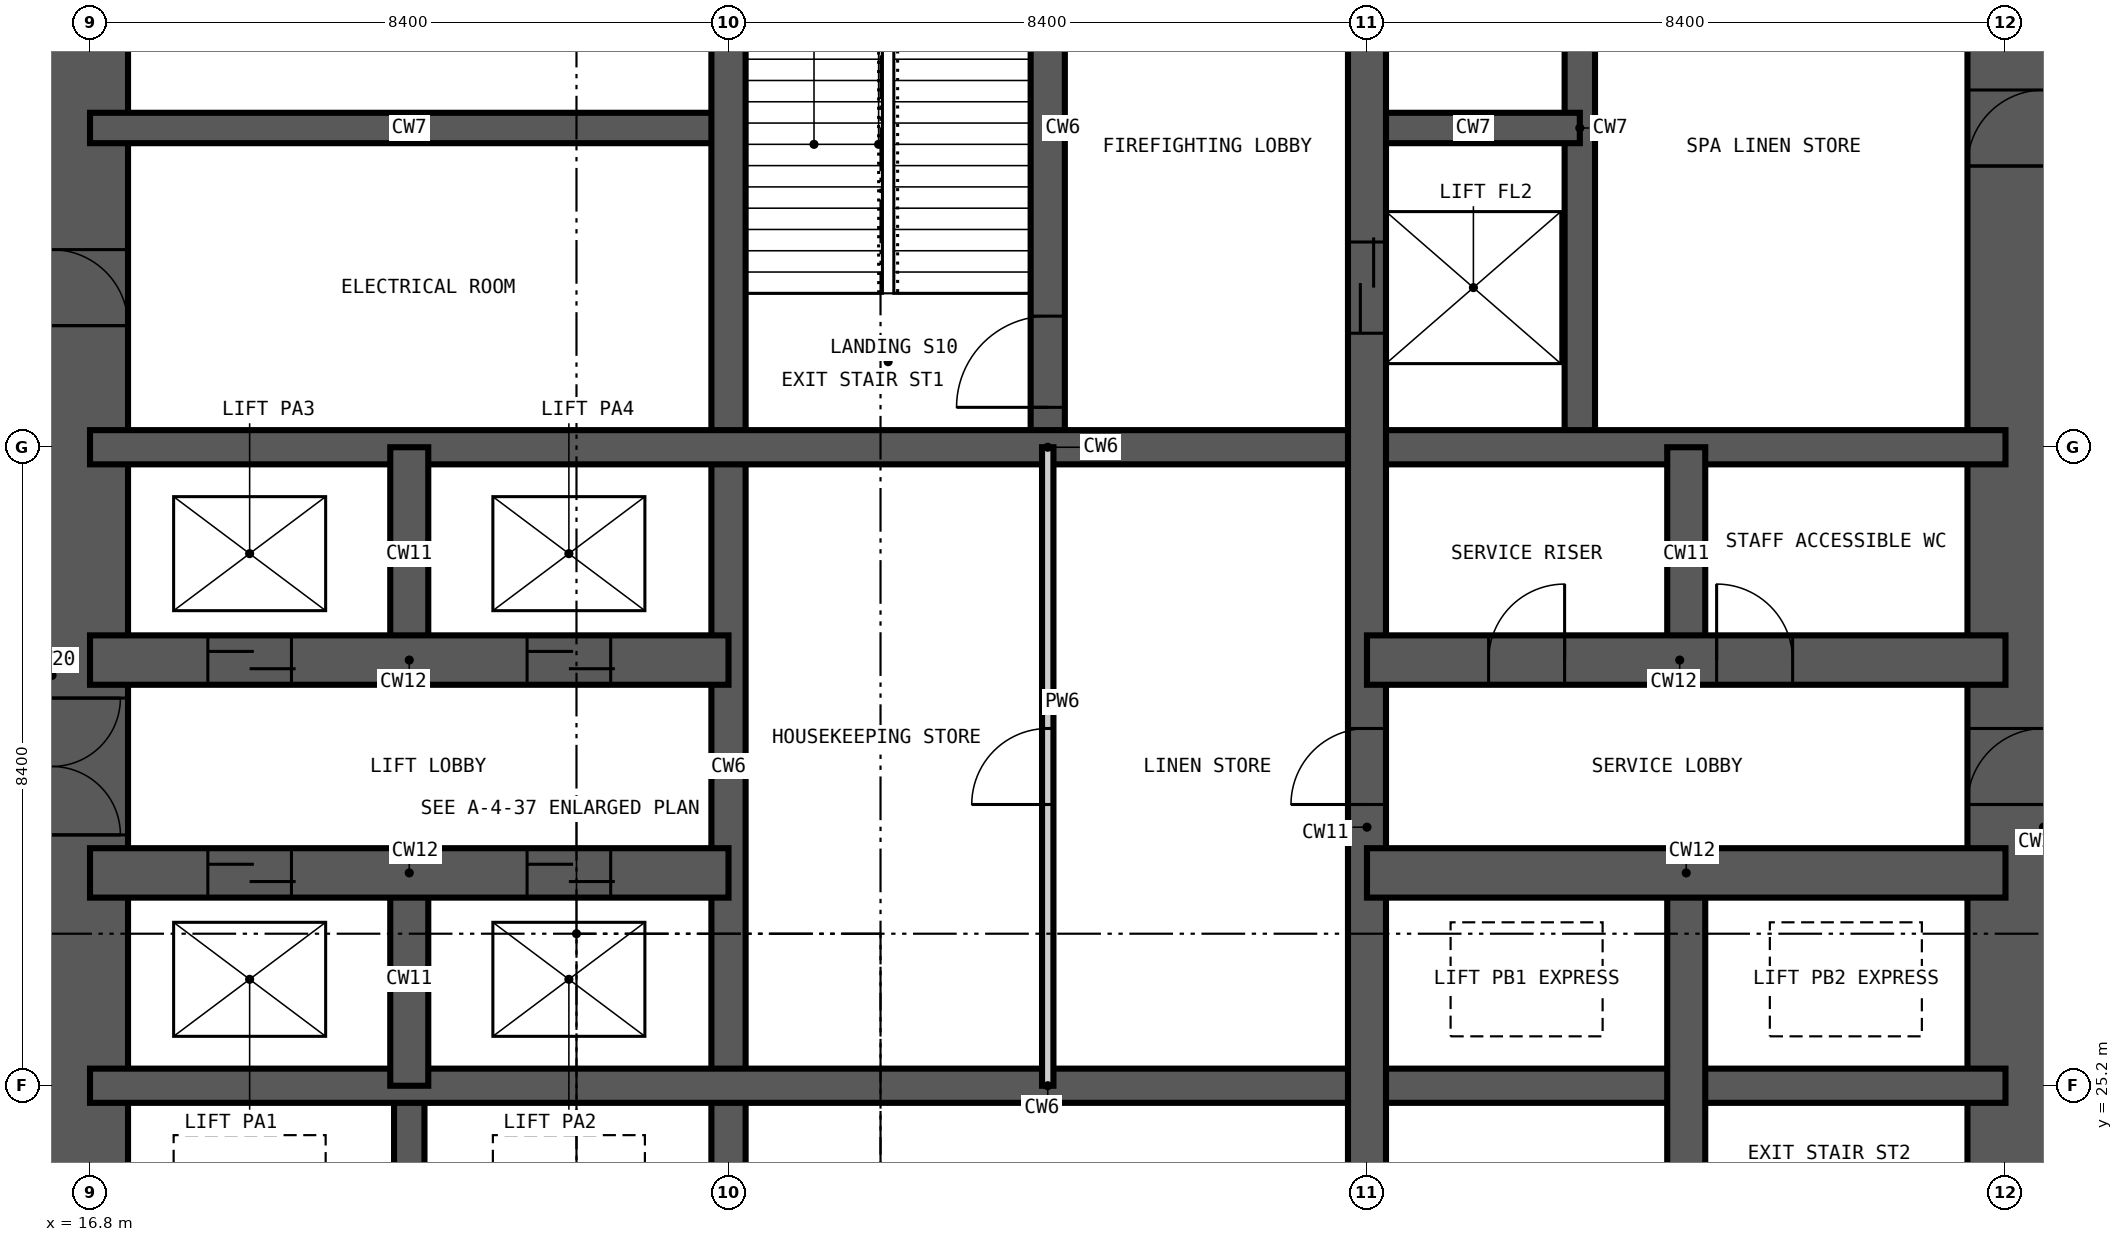
"""IFC4 building model, lengths in metres.
Left out: names, types, materials, properties, quantities, classifications, styles, units other than length and angle.
Written with IfcOpenShell. Run it as: python <this file> out.ifc"""

import sys

from ifc_helpers import new_model, si_unit, direction, frame, frame_2d, origin, place, context, subcontext, project, spatial, rectangle, extrude, element, fill, save


model = new_model("IFC4")
c1 = context("Model", 3, precision=1e-05, world=origin(), true_north=direction((0.0, 1.0)))
c2 = subcontext(c1, "Body", "Model", "MODEL_VIEW")
j1 = project(units=[si_unit("LENGTHUNIT", "METRE"), si_unit("PLANEANGLEUNIT", "RADIAN")], contexts=[c1])
p1 = place(None, origin())
s1 = spatial("IfcSite", under=j1, at=p1, CompositionType="ELEMENT")
p2 = place(p1, origin())
s2 = spatial("IfcBuilding", under=s1, at=p2, CompositionType="ELEMENT")
p3 = place(p2, frame((0.0, 0.0, 22.0)))
s3 = spatial("IfcBuildingStorey", under=s2, at=p3, CompositionType="ELEMENT", Elevation=22.0)
p4 = place(p3, frame((42.5, 17.3, -0.35), z_axis=(0.0, 0.0, 1.0), x_axis=(0.0, 1.0, 0.0)))
e1 = element("IfcWall", 1, at=p4, inside=s3, PredefinedType="SHEAR", context=c2, shape_type="SweptSolid", body=[
    extrude(rectangle(XDim=24.2, YDim=2.0, at=frame_2d((12.1, 0.0))), origin(), (0.0, 0.0, 1.0), 5.0),
])
p5 = place(p4, frame((0.3, 0.0, 0.35)))
e2 = element("IfcOpeningElement", 2, at=p5, cuts=e1, PredefinedType="OPENING", context=c2, shape_type="SweptSolid", body=[
    extrude(rectangle(XDim=1.2, YDim=2.2, at=frame_2d((0.6, 1.1))), frame((0.0, 1.01, 0.0), z_axis=(0.0, -1.0, 0.0), x_axis=(1.0, 0.0, 0.0)), (0.0, 0.0, 1.0), 2.02),
])
p6 = place(p4, frame((11.6, 0.0, 0.35)))
e3 = element("IfcOpeningElement", 3, at=p6, cuts=e1, PredefinedType="OPENING", context=c2, shape_type="SweptSolid", body=[
    extrude(rectangle(XDim=1.0, YDim=2.1, at=frame_2d((0.5, 1.05))), frame((0.0, 1.01, 0.0), z_axis=(0.0, -1.0, 0.0), x_axis=(1.0, 0.0, 0.0)), (0.0, 0.0, 1.0), 2.02),
])
p7 = place(p4, frame((20.0, 0.0, 0.35)))
e4 = element("IfcOpeningElement", 4, at=p7, cuts=e1, PredefinedType="OPENING", context=c2, shape_type="SweptSolid", body=[
    extrude(rectangle(XDim=1.0, YDim=2.1, at=frame_2d((0.5, 1.05))), frame((0.0, 1.01, 0.0), z_axis=(0.0, -1.0, 0.0), x_axis=(1.0, 0.0, 0.0)), (0.0, 0.0, 1.0), 2.02),
])
p8 = place(p3, frame((16.3, 41.5, -0.35), z_axis=(0.0, 0.0, 1.0), x_axis=(0.0, -1.0, 0.0)))
e5 = element("IfcWall", 5, at=p8, inside=s3, PredefinedType="SHEAR", context=c2, shape_type="SweptSolid", body=[
    extrude(rectangle(XDim=24.2, YDim=2.0, at=frame_2d((12.1, 0.0))), origin(), (0.0, 0.0, 1.0), 5.0),
])
p9 = place(p8, frame((11.2, 0.0, 0.35)))
e6 = element("IfcOpeningElement", 6, at=p9, cuts=e5, PredefinedType="OPENING", context=c2, shape_type="SweptSolid", body=[
    extrude(rectangle(XDim=1.8, YDim=2.2, at=frame_2d((0.9, 1.1))), frame((0.0, 1.01, 0.0), z_axis=(0.0, -1.0, 0.0), x_axis=(1.0, 0.0, 0.0)), (0.0, 0.0, 1.0), 2.02),
])
p10 = place(p8, frame((20.0, 0.0, 0.35)))
e7 = element("IfcOpeningElement", 7, at=p10, cuts=e5, PredefinedType="OPENING", context=c2, shape_type="SweptSolid", body=[
    extrude(rectangle(XDim=1.0, YDim=2.1, at=frame_2d((0.5, 1.05))), frame((0.0, 1.01, 0.0), z_axis=(0.0, -1.0, 0.0), x_axis=(1.0, 0.0, 0.0)), (0.0, 0.0, 1.0), 2.02),
])
p11 = place(p8, frame((5.3, 0.0, 0.35)))
e8 = element("IfcOpeningElement", 8, at=p11, cuts=e5, PredefinedType="OPENING", context=c2, shape_type="SweptSolid", body=[
    extrude(rectangle(XDim=1.0, YDim=2.1, at=frame_2d((0.5, 1.05))), frame((0.0, 1.01, 0.0), z_axis=(0.0, -1.0, 0.0), x_axis=(1.0, 0.0, 0.0)), (0.0, 0.0, 1.0), 2.02),
])
p12 = place(p3, frame((21.0, 22.4, -0.35), z_axis=(0.0, 0.0, 1.0), x_axis=(0.0, 1.0, 0.0)))
e9 = element("IfcWall", 9, at=p12, inside=s3, PredefinedType="SHEAR", context=c2, shape_type="SweptSolid", body=[
    extrude(rectangle(XDim=2.8, YDim=0.4, at=frame_2d((1.4, 0.0))), origin(), (0.0, 0.0, 1.0), 5.0),
])
for number, where, z_axis, x_axis in (
    (10, (36.4, 33.6, -0.35), (0.0, 0.0, 1.0), (0.0, 1.0, 0.0)),
    (11, (16.8, 37.8, -0.35), (0.0, 0.0, 1.0), (1.0, 0.0, 0.0)),
):
    element("IfcWall", number, at=place(p3, frame(where, z_axis=z_axis, x_axis=x_axis)), inside=s3, PredefinedType="SHEAR", context=c2, shape_type="SweptSolid", body=[
        extrude(rectangle(XDim=8.4, YDim=0.4, at=frame_2d((4.2, 0.0))), origin(), (0.0, 0.0, 1.0), 5.0),
    ])
p13 = place(p3, frame((33.6, 37.8, -0.35), z_axis=(0.0, 0.0, 1.0), x_axis=(1.0, 0.0, 0.0)))
e12 = element("IfcWall", 12, at=p13, inside=s3, PredefinedType="SHEAR", context=c2, shape_type="SweptSolid", body=[
    extrude(rectangle(XDim=2.8, YDim=0.4, at=frame_2d((1.4, 0.0))), origin(), (0.0, 0.0, 1.0), 5.0),
])
p14 = place(p3, frame((25.2, 16.8, -0.35), z_axis=(0.0, 0.0, 1.0), x_axis=(0.0, 1.0, 0.0)))
e13 = element("IfcWall", 13, at=p14, inside=s3, PredefinedType="SHEAR", context=c2, shape_type="SweptSolid", body=[
    extrude(rectangle(XDim=25.2, YDim=0.45, at=frame_2d((12.6, 0.0))), origin(), (0.0, 0.0, 1.0), 5.0),
])
p15 = place(p3, frame((29.4, 33.6, -0.35), z_axis=(0.0, 0.0, 1.0), x_axis=(0.0, 1.0, 0.0)))
e14 = element("IfcWall", 14, at=p15, inside=s3, PredefinedType="SHEAR", context=c2, shape_type="SweptSolid", body=[
    extrude(rectangle(XDim=8.4, YDim=0.45, at=frame_2d((4.2, 0.0))), origin(), (0.0, 0.0, 1.0), 5.0),
])
p16 = place(p15, frame((0.525, 0.0, 0.35)))
e15 = element("IfcOpeningElement", 15, at=p16, cuts=e14, PredefinedType="OPENING", context=c2, shape_type="SweptSolid", body=[
    extrude(rectangle(XDim=1.2, YDim=2.2, at=frame_2d((0.6, 1.1))), frame((0.0, 0.235, 0.0), z_axis=(0.0, -1.0, 0.0), x_axis=(1.0, 0.0, 0.0)), (0.0, 0.0, 1.0), 0.47),
])
for number, where, z_axis, x_axis in (
    (16, (16.8, 25.2, -0.35), (0.0, 0.0, 1.0), (1.0, 0.0, 0.0)),
    (17, (16.8, 33.6, -0.35), (0.0, 0.0, 1.0), (1.0, 0.0, 0.0)),
):
    element("IfcWall", number, at=place(p3, frame(where, z_axis=z_axis, x_axis=x_axis)), inside=s3, PredefinedType="SHEAR", context=c2, shape_type="SweptSolid", body=[
        extrude(rectangle(XDim=25.2, YDim=0.45, at=frame_2d((12.6, 0.0))), origin(), (0.0, 0.0, 1.0), 5.0),
    ])
for number, where, z_axis, x_axis in (
    (18, (21.0, 25.2, -0.35), (0.0, 0.0, 1.0), (0.0, 1.0, 0.0)),
    (19, (21.0, 30.8, -0.35), (0.0, 0.0, 1.0), (0.0, 1.0, 0.0)),
):
    element("IfcWall", number, at=place(p3, frame(where, z_axis=z_axis, x_axis=x_axis)), inside=s3, PredefinedType="SHEAR", context=c2, shape_type="SweptSolid", body=[
        extrude(rectangle(XDim=2.8, YDim=0.5, at=frame_2d((1.4, 0.0))), origin(), (0.0, 0.0, 1.0), 5.0),
    ])
p17 = place(p3, frame((33.6, 16.8, -0.35), z_axis=(0.0, 0.0, 1.0), x_axis=(0.0, 1.0, 0.0)))
e20 = element("IfcWall", 20, at=p17, inside=s3, PredefinedType="SHEAR", context=c2, shape_type="SweptSolid", body=[
    extrude(rectangle(XDim=25.2, YDim=0.5, at=frame_2d((12.6, 0.0))), origin(), (0.0, 0.0, 1.0), 5.0),
])
p18 = place(p17, frame((22.5, 0.0, 0.35)))
e21 = element("IfcOpeningElement", 21, at=p18, cuts=e20, PredefinedType="OPENING", context=c2, shape_type="SweptSolid", body=[
    extrude(rectangle(XDim=1.2, YDim=2.2, at=frame_2d((0.6, 1.1))), frame((0.0, 0.26, 0.0), z_axis=(0.0, -1.0, 0.0), x_axis=(1.0, 0.0, 0.0)), (0.0, 0.0, 1.0), 0.52),
])
p19 = place(p17, frame((18.3, 0.0, 0.35)))
e22 = element("IfcOpeningElement", 22, at=p19, cuts=e20, PredefinedType="OPENING", context=c2, shape_type="SweptSolid", body=[
    extrude(rectangle(XDim=1.2, YDim=2.2, at=frame_2d((0.6, 1.1))), frame((0.0, 0.26, 0.0), z_axis=(0.0, -1.0, 0.0), x_axis=(1.0, 0.0, 0.0)), (0.0, 0.0, 1.0), 0.52),
])
p20 = place(p17, frame((12.1, 0.0, 0.35)))
e23 = element("IfcOpeningElement", 23, at=p20, cuts=e20, PredefinedType="OPENING", context=c2, shape_type="SweptSolid", body=[
    extrude(rectangle(XDim=1.0, YDim=2.1, at=frame_2d((0.5, 1.05))), frame((0.0, 0.26, 0.0), z_axis=(0.0, -1.0, 0.0), x_axis=(1.0, 0.0, 0.0)), (0.0, 0.0, 1.0), 0.52),
])
p21 = place(p3, frame((37.8, 16.8, -0.35), z_axis=(0.0, 0.0, 1.0), x_axis=(0.0, 1.0, 0.0)))
e24 = element("IfcWall", 24, at=p21, inside=s3, PredefinedType="SHEAR", context=c2, shape_type="SweptSolid", body=[
    extrude(rectangle(XDim=11.2, YDim=0.5, at=frame_2d((5.6, 0.0))), origin(), (0.0, 0.0, 1.0), 5.0),
])
p22 = place(p3, frame((37.8, 30.8, -0.35), z_axis=(0.0, 0.0, 1.0), x_axis=(0.0, 1.0, 0.0)))
e25 = element("IfcWall", 25, at=p22, inside=s3, PredefinedType="SHEAR", context=c2, shape_type="SweptSolid", body=[
    extrude(rectangle(XDim=2.8, YDim=0.5, at=frame_2d((1.4, 0.0))), origin(), (0.0, 0.0, 1.0), 5.0),
])
p23 = place(p3, frame((16.8, 28.0, -0.35), z_axis=(0.0, 0.0, 1.0), x_axis=(1.0, 0.0, 0.0)))
e26 = element("IfcWall", 26, at=p23, inside=s3, PredefinedType="SHEAR", context=c2, shape_type="SweptSolid", body=[
    extrude(rectangle(XDim=8.4, YDim=0.65, at=frame_2d((4.2, 0.0))), origin(), (0.0, 0.0, 1.0), 5.0),
])
p24 = place(p23, frame((1.55, 0.0, 0.35)))
e27 = element("IfcOpeningElement", 27, at=p24, cuts=e26, PredefinedType="OPENING", context=c2, shape_type="SweptSolid", body=[
    extrude(rectangle(XDim=1.1, YDim=2.2, at=frame_2d((0.55, 1.1))), frame((0.0, 0.335, 0.0), z_axis=(0.0, -1.0, 0.0), x_axis=(1.0, 0.0, 0.0)), (0.0, 0.0, 1.0), 0.67),
])
p25 = place(p23, frame((5.75, 0.0, 0.35)))
e28 = element("IfcOpeningElement", 28, at=p25, cuts=e26, PredefinedType="OPENING", context=c2, shape_type="SweptSolid", body=[
    extrude(rectangle(XDim=1.1, YDim=2.2, at=frame_2d((0.55, 1.1))), frame((0.0, 0.335, 0.0), z_axis=(0.0, -1.0, 0.0), x_axis=(1.0, 0.0, 0.0)), (0.0, 0.0, 1.0), 0.67),
])
p26 = place(p3, frame((33.6, 28.0, -0.35), z_axis=(0.0, 0.0, 1.0), x_axis=(1.0, 0.0, 0.0)))
e29 = element("IfcWall", 29, at=p26, inside=s3, PredefinedType="SHEAR", context=c2, shape_type="SweptSolid", body=[
    extrude(rectangle(XDim=8.4, YDim=0.65, at=frame_2d((4.2, 0.0))), origin(), (0.0, 0.0, 1.0), 5.0),
])
p27 = place(p3, frame((16.8, 30.8, -0.35), z_axis=(0.0, 0.0, 1.0), x_axis=(1.0, 0.0, 0.0)))
e30 = element("IfcWall", 30, at=p27, inside=s3, PredefinedType="SHEAR", context=c2, shape_type="SweptSolid", body=[
    extrude(rectangle(XDim=8.4, YDim=0.65, at=frame_2d((4.2, 0.0))), origin(), (0.0, 0.0, 1.0), 5.0),
])
p28 = place(p27, frame((1.55, 0.0, 0.35)))
e31 = element("IfcOpeningElement", 31, at=p28, cuts=e30, PredefinedType="OPENING", context=c2, shape_type="SweptSolid", body=[
    extrude(rectangle(XDim=1.1, YDim=2.2, at=frame_2d((0.55, 1.1))), frame((0.0, 0.335, 0.0), z_axis=(0.0, -1.0, 0.0), x_axis=(1.0, 0.0, 0.0)), (0.0, 0.0, 1.0), 0.67),
])
p29 = place(p27, frame((5.75, 0.0, 0.35)))
e32 = element("IfcOpeningElement", 32, at=p29, cuts=e30, PredefinedType="OPENING", context=c2, shape_type="SweptSolid", body=[
    extrude(rectangle(XDim=1.1, YDim=2.2, at=frame_2d((0.55, 1.1))), frame((0.0, 0.335, 0.0), z_axis=(0.0, -1.0, 0.0), x_axis=(1.0, 0.0, 0.0)), (0.0, 0.0, 1.0), 0.67),
])
p30 = place(p3, frame((33.6, 30.8, -0.35), z_axis=(0.0, 0.0, 1.0), x_axis=(1.0, 0.0, 0.0)))
e33 = element("IfcWall", 33, at=p30, inside=s3, PredefinedType="SHEAR", context=c2, shape_type="SweptSolid", body=[
    extrude(rectangle(XDim=8.4, YDim=0.65, at=frame_2d((4.2, 0.0))), origin(), (0.0, 0.0, 1.0), 5.0),
])
p31 = place(p30, frame((1.6, 0.0, 0.35)))
e34 = element("IfcOpeningElement", 34, at=p31, cuts=e33, PredefinedType="OPENING", context=c2, shape_type="SweptSolid", body=[
    extrude(rectangle(XDim=1.0, YDim=2.1, at=frame_2d((0.5, 1.05))), frame((0.0, 0.335, 0.0), z_axis=(0.0, -1.0, 0.0), x_axis=(1.0, 0.0, 0.0)), (0.0, 0.0, 1.0), 0.67),
])
p32 = place(p30, frame((4.6, 0.0, 0.35)))
e35 = element("IfcOpeningElement", 35, at=p32, cuts=e33, PredefinedType="OPENING", context=c2, shape_type="SweptSolid", body=[
    extrude(rectangle(XDim=1.0, YDim=2.1, at=frame_2d((0.5, 1.05))), frame((0.0, 0.335, 0.0), z_axis=(0.0, -1.0, 0.0), x_axis=(1.0, 0.0, 0.0)), (0.0, 0.0, 1.0), 0.67),
])
p33 = place(p3, frame((29.4, 25.2, 0.0), z_axis=(0.0, 0.0, 1.0), x_axis=(0.0, 1.0, 0.0)))
e36 = element("IfcWall", 36, at=p33, inside=s3, PredefinedType="PARTITIONING", context=c2, shape_type="SweptSolid", body=[
    extrude(rectangle(XDim=8.4, YDim=0.15, at=frame_2d((4.2, 0.0))), origin(), (0.0, 0.0, 1.0), 4.65),
])
p34 = place(p33, frame((3.7, 0.0, 0.0)))
e37 = element("IfcOpeningElement", 37, at=p34, cuts=e36, PredefinedType="OPENING", context=c2, shape_type="SweptSolid", body=[
    extrude(rectangle(XDim=1.0, YDim=2.1, at=frame_2d((0.5, 1.05))), frame((0.0, 0.085, 0.0), z_axis=(0.0, -1.0, 0.0), x_axis=(1.0, 0.0, 0.0)), (0.0, 0.0, 1.0), 0.17),
])
p35 = place(p16, origin())
e38 = element("IfcDoor", 38, at=p35, inside=s3, OperationType="SINGLE_SWING_LEFT", PredefinedType="DOOR", context=c2, shape_type="SweptSolid", body=[
    extrude(rectangle(XDim=1.2, YDim=2.2, at=frame_2d((0.6, 1.1))), frame((0.0, 0.025, 0.0), z_axis=(0.0, -1.0, 0.0), x_axis=(1.0, 0.0, 0.0)), (0.0, 0.0, 1.0), 0.05),
])
fill(e15, e38)
p36 = place(p24, origin())
e39 = element("IfcDoor", 39, at=p36, inside=s3, OperationType="DOUBLE_DOOR_SLIDING", PredefinedType="DOOR", context=c2, shape_type="SweptSolid", body=[
    extrude(rectangle(XDim=1.1, YDim=2.2, at=frame_2d((0.55, 1.1))), frame((0.0, 0.025, 0.0), z_axis=(0.0, -1.0, 0.0), x_axis=(1.0, 0.0, 0.0)), (0.0, 0.0, 1.0), 0.05),
])
fill(e27, e39)
p37 = place(p25, origin())
e40 = element("IfcDoor", 40, at=p37, inside=s3, OperationType="DOUBLE_DOOR_SLIDING", PredefinedType="DOOR", context=c2, shape_type="SweptSolid", body=[
    extrude(rectangle(XDim=1.1, YDim=2.2, at=frame_2d((0.55, 1.1))), frame((0.0, 0.025, 0.0), z_axis=(0.0, -1.0, 0.0), x_axis=(1.0, 0.0, 0.0)), (0.0, 0.0, 1.0), 0.05),
])
fill(e28, e40)
p38 = place(p28, origin())
e41 = element("IfcDoor", 41, at=p38, inside=s3, OperationType="DOUBLE_DOOR_SLIDING", PredefinedType="DOOR", context=c2, shape_type="SweptSolid", body=[
    extrude(rectangle(XDim=1.1, YDim=2.2, at=frame_2d((0.55, 1.1))), frame((0.0, 0.025, 0.0), z_axis=(0.0, -1.0, 0.0), x_axis=(1.0, 0.0, 0.0)), (0.0, 0.0, 1.0), 0.05),
])
fill(e31, e41)
p39 = place(p29, origin())
e42 = element("IfcDoor", 42, at=p39, inside=s3, OperationType="DOUBLE_DOOR_SLIDING", PredefinedType="DOOR", context=c2, shape_type="SweptSolid", body=[
    extrude(rectangle(XDim=1.1, YDim=2.2, at=frame_2d((0.55, 1.1))), frame((0.0, 0.025, 0.0), z_axis=(0.0, -1.0, 0.0), x_axis=(1.0, 0.0, 0.0)), (0.0, 0.0, 1.0), 0.05),
])
fill(e32, e42)
p40 = place(p19, origin())
e43 = element("IfcDoor", 43, at=p40, inside=s3, OperationType="DOUBLE_DOOR_SLIDING", PredefinedType="DOOR", context=c2, shape_type="SweptSolid", body=[
    extrude(rectangle(XDim=1.2, YDim=2.2, at=frame_2d((0.6, 1.1))), frame((0.0, 0.025, 0.0), z_axis=(0.0, -1.0, 0.0), x_axis=(1.0, 0.0, 0.0)), (0.0, 0.0, 1.0), 0.05),
])
fill(e22, e43)
p41 = place(p9, origin())
e44 = element("IfcDoor", 44, at=p41, inside=s3, OperationType="DOUBLE_DOOR_DOUBLE_SWING", PredefinedType="DOOR", context=c2, shape_type="SweptSolid", body=[
    extrude(rectangle(XDim=1.8, YDim=2.2, at=frame_2d((0.9, 1.1))), frame((0.0, 0.025, 0.0), z_axis=(0.0, -1.0, 0.0), x_axis=(1.0, 0.0, 0.0)), (0.0, 0.0, 1.0), 0.05),
])
fill(e6, e44)
p42 = place(p11, origin())
e45 = element("IfcDoor", 45, at=p42, inside=s3, OperationType="SINGLE_SWING_RIGHT", PredefinedType="DOOR", context=c2, shape_type="SweptSolid", body=[
    extrude(rectangle(XDim=1.0, YDim=2.1, at=frame_2d((0.5, 1.05))), frame((0.0, 0.025, 0.0), z_axis=(0.0, -1.0, 0.0), x_axis=(1.0, 0.0, 0.0)), (0.0, 0.0, 1.0), 0.05),
])
fill(e8, e45)
p43 = place(p20, origin())
e46 = element("IfcDoor", 46, at=p43, inside=s3, OperationType="SINGLE_SWING_LEFT", PredefinedType="DOOR", context=c2, shape_type="SweptSolid", body=[
    extrude(rectangle(XDim=1.0, YDim=2.1, at=frame_2d((0.5, 1.05))), frame((0.0, 0.025, 0.0), z_axis=(0.0, -1.0, 0.0), x_axis=(1.0, 0.0, 0.0)), (0.0, 0.0, 1.0), 0.05),
])
fill(e23, e46)
p44 = place(p34, origin())
e47 = element("IfcDoor", 47, at=p44, inside=s3, OperationType="SINGLE_SWING_LEFT", PredefinedType="DOOR", context=c2, shape_type="SweptSolid", body=[
    extrude(rectangle(XDim=1.0, YDim=2.1, at=frame_2d((0.5, 1.05))), frame((0.0, 0.025, 0.0), z_axis=(0.0, -1.0, 0.0), x_axis=(1.0, 0.0, 0.0)), (0.0, 0.0, 1.0), 0.05),
])
fill(e37, e47)
p45 = place(p31, origin())
e48 = element("IfcDoor", 48, at=p45, inside=s3, OperationType="SINGLE_SWING_RIGHT", PredefinedType="DOOR", context=c2, shape_type="SweptSolid", body=[
    extrude(rectangle(XDim=1.0, YDim=2.1, at=frame_2d((0.5, 1.05))), frame((0.0, 0.025, 0.0), z_axis=(0.0, -1.0, 0.0), x_axis=(1.0, 0.0, 0.0)), (0.0, 0.0, 1.0), 0.05),
])
fill(e34, e48)
p46 = place(p32, origin())
e49 = element("IfcDoor", 49, at=p46, inside=s3, OperationType="SINGLE_SWING_LEFT", PredefinedType="DOOR", context=c2, shape_type="SweptSolid", body=[
    extrude(rectangle(XDim=1.0, YDim=2.1, at=frame_2d((0.5, 1.05))), frame((0.0, 0.025, 0.0), z_axis=(0.0, -1.0, 0.0), x_axis=(1.0, 0.0, 0.0)), (0.0, 0.0, 1.0), 0.05),
])
fill(e35, e49)
p47 = place(p6, origin())
e50 = element("IfcDoor", 50, at=p47, inside=s3, OperationType="SINGLE_SWING_LEFT", PredefinedType="DOOR", context=c2, shape_type="SweptSolid", body=[
    extrude(rectangle(XDim=1.0, YDim=2.1, at=frame_2d((0.5, 1.05))), frame((0.0, 0.025, 0.0), z_axis=(0.0, -1.0, 0.0), x_axis=(1.0, 0.0, 0.0)), (0.0, 0.0, 1.0), 0.05),
])
fill(e3, e50)
p48 = place(p7, origin())
e51 = element("IfcDoor", 51, at=p48, inside=s3, OperationType="SINGLE_SWING_LEFT", PredefinedType="DOOR", context=c2, shape_type="SweptSolid", body=[
    extrude(rectangle(XDim=1.0, YDim=2.1, at=frame_2d((0.5, 1.05))), frame((0.0, 0.025, 0.0), z_axis=(0.0, -1.0, 0.0), x_axis=(1.0, 0.0, 0.0)), (0.0, 0.0, 1.0), 0.05),
])
fill(e4, e51)
save(model, sys.argv[1])
